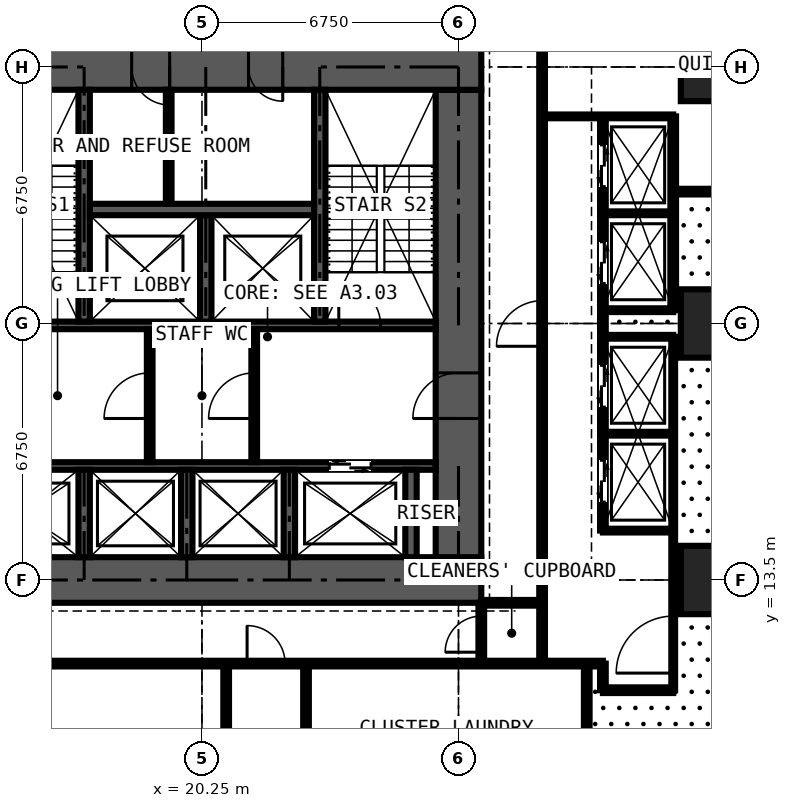
"""IFC4 building model, lengths in metres.
Left out: names, types, materials, properties, quantities, classifications, styles, units other than length and angle.
Written with IfcOpenShell. Run it as: python <this file> out.ifc"""

import sys

from ifc_helpers import new_model, si_unit, direction, frame, frame_2d, origin, origin_2d, place, context, subcontext, project, spatial, rectangle, extrude, element, fill, save


model = new_model("IFC4")
c1 = context("Model", 3, precision=1e-05, world=origin(), true_north=direction((0.0, 1.0)))
c2 = subcontext(c1, "Body", "Model", "MODEL_VIEW")
j1 = project(units=[si_unit("LENGTHUNIT", "METRE"), si_unit("PLANEANGLEUNIT", "RADIAN")], contexts=[c1])
p1 = place(None, origin())
s1 = spatial("IfcSite", under=j1, at=p1, CompositionType="ELEMENT")
p2 = place(p1, origin())
s2 = spatial("IfcBuilding", under=s1, at=p2, CompositionType="ELEMENT")
p3 = place(p2, frame((0.0, 0.0, 46.8)))
s3 = spatial("IfcBuildingStorey", under=s2, at=p3, CompositionType="ELEMENT", Elevation=46.8)
for number, where, z_axis, x_axis in (
    (1, (33.75, 13.5, 0.0), (0.0, 0.0, 1.0), (1.0, 0.0, 0.0)),
    (2, (33.75, 20.25, 0.0), (0.0, 0.0, 1.0), (1.0, 0.0, 0.0)),
    (3, (33.75, 27.0, 0.0), (0.0, 0.0, 1.0), (1.0, 0.0, 0.0)),
):
    element("IfcColumn", number, at=place(p3, frame(where, z_axis=z_axis, x_axis=x_axis)), inside=s3, PredefinedType="COLUMN", context=c2, shape_type="SweptSolid", body=[
        extrude(rectangle(XDim=1.8, YDim=1.8, at=origin_2d()), origin(), (0.0, 0.0, 1.0), 3.6),
    ])
p4 = place(p3, frame((12.9, 13.5, 0.0), z_axis=(0.0, 0.0, 1.0), x_axis=(1.0, 0.0, 0.0)))
e4 = element("IfcWall", 4, at=p4, inside=s3, PredefinedType="SHEAR", context=c2, shape_type="SweptSolid", body=[
    extrude(rectangle(XDim=14.7, YDim=1.2, at=frame_2d((7.35, 0.0))), origin(), (0.0, 0.0, 1.0), 3.6),
])
p5 = place(p3, frame((27.0, 14.1, 0.0), z_axis=(0.0, 0.0, 1.0), x_axis=(0.0, 1.0, 0.0)))
e5 = element("IfcWall", 5, at=p5, inside=s3, PredefinedType="SHEAR", context=c2, shape_type="SweptSolid", body=[
    extrude(rectangle(XDim=12.3, YDim=1.2, at=frame_2d((6.15, 0.0))), origin(), (0.0, 0.0, 1.0), 3.6),
])
p6 = place(p5, frame((3.65, 0.0, 0.0)))
e6 = element("IfcOpeningElement", 6, at=p6, cuts=e5, PredefinedType="OPENING", context=c2, shape_type="SweptSolid", body=[
    extrude(rectangle(XDim=1.2, YDim=2.2, at=frame_2d((0.6, 1.1))), frame((0.0, 0.61, 0.0), z_axis=(0.0, -1.0, 0.0), x_axis=(1.0, 0.0, 0.0)), (0.0, 0.0, 1.0), 1.22),
])
p7 = place(p3, frame((27.6, 27.0, 0.0), z_axis=(0.0, 0.0, 1.0), x_axis=(-1.0, 0.0, 0.0)))
e7 = element("IfcWall", 7, at=p7, inside=s3, PredefinedType="SHEAR", context=c2, shape_type="SweptSolid", body=[
    extrude(rectangle(XDim=14.7, YDim=1.2, at=frame_2d((7.35, 0.0))), origin(), (0.0, 0.0, 1.0), 3.6),
])
p8 = place(p7, frame((5.225, 0.0, 0.0)))
e8 = element("IfcOpeningElement", 8, at=p8, cuts=e7, PredefinedType="OPENING", context=c2, shape_type="SweptSolid", body=[
    extrude(rectangle(XDim=0.9, YDim=2.2, at=frame_2d((0.45, 1.1))), frame((0.0, 0.61, 0.0), z_axis=(0.0, -1.0, 0.0), x_axis=(1.0, 0.0, 0.0)), (0.0, 0.0, 1.0), 1.22),
])
p9 = place(p7, frame((8.2, 0.0, 0.0)))
e9 = element("IfcOpeningElement", 9, at=p9, cuts=e7, PredefinedType="OPENING", context=c2, shape_type="SweptSolid", body=[
    extrude(rectangle(XDim=1.0, YDim=2.2, at=frame_2d((0.5, 1.1))), frame((0.0, 0.61, 0.0), z_axis=(0.0, -1.0, 0.0), x_axis=(1.0, 0.0, 0.0)), (0.0, 0.0, 1.0), 1.22),
])
p10 = place(p3, frame((14.1, 16.5, 0.0), z_axis=(0.0, 0.0, 1.0), x_axis=(1.0, 0.0, 0.0)))
e10 = element("IfcWall", 10, at=p10, inside=s3, PredefinedType="SHEAR", context=c2, shape_type="SweptSolid", body=[
    extrude(rectangle(XDim=12.3, YDim=0.2, at=frame_2d((6.15, 0.0))), origin(), (0.0, 0.0, 1.0), 3.6),
])
p11 = place(p10, frame((0.9, 0.0, 0.0)))
e11 = element("IfcOpeningElement", 11, at=p11, cuts=e10, PredefinedType="OPENING", context=c2, shape_type="SweptSolid", body=[
    extrude(rectangle(XDim=1.1, YDim=2.2, at=frame_2d((0.55, 1.1))), frame((0.0, 0.11, 0.0), z_axis=(0.0, -1.0, 0.0), x_axis=(1.0, 0.0, 0.0)), (0.0, 0.0, 1.0), 0.22),
])
p12 = place(p10, frame((9.5, 0.0, 0.0)))
e12 = element("IfcOpeningElement", 12, at=p12, cuts=e10, PredefinedType="OPENING", context=c2, shape_type="SweptSolid", body=[
    extrude(rectangle(XDim=1.1, YDim=2.2, at=frame_2d((0.55, 1.1))), frame((0.0, 0.11, 0.0), z_axis=(0.0, -1.0, 0.0), x_axis=(1.0, 0.0, 0.0)), (0.0, 0.0, 1.0), 0.22),
])
p13 = place(p3, frame((14.1, 20.2, 0.0), z_axis=(0.0, 0.0, 1.0), x_axis=(1.0, 0.0, 0.0)))
e13 = element("IfcWall", 13, at=p13, inside=s3, PredefinedType="SHEAR", context=c2, shape_type="SweptSolid", body=[
    extrude(rectangle(XDim=12.3, YDim=0.2, at=frame_2d((6.15, 0.0))), origin(), (0.0, 0.0, 1.0), 3.6),
])
p14 = place(p13, frame((0.35, 0.0, 0.0)))
e14 = element("IfcOpeningElement", 14, at=p14, cuts=e13, PredefinedType="OPENING", context=c2, shape_type="SweptSolid", body=[
    extrude(rectangle(XDim=1.1, YDim=2.2, at=frame_2d((0.55, 1.1))), frame((0.0, 0.11, 0.0), z_axis=(0.0, -1.0, 0.0), x_axis=(1.0, 0.0, 0.0)), (0.0, 0.0, 1.0), 0.22),
])
p15 = place(p13, frame((9.75, 0.0, 0.0)))
e15 = element("IfcOpeningElement", 15, at=p15, cuts=e13, PredefinedType="OPENING", context=c2, shape_type="SweptSolid", body=[
    extrude(rectangle(XDim=1.1, YDim=2.2, at=frame_2d((0.55, 1.1))), frame((0.0, 0.11, 0.0), z_axis=(0.0, -1.0, 0.0), x_axis=(1.0, 0.0, 0.0)), (0.0, 0.0, 1.0), 0.22),
])
for number, where, z_axis, x_axis in (
    (16, (17.15, 20.3, 0.0), (0.0, 0.0, 1.0), (0.0, 1.0, 0.0)),
    (17, (23.35, 20.3, 0.0), (0.0, 0.0, 1.0), (0.0, 1.0, 0.0)),
):
    element("IfcWall", number, at=place(p3, frame(where, z_axis=z_axis, x_axis=x_axis)), inside=s3, PredefinedType="SHEAR", context=c2, shape_type="SweptSolid", body=[
        extrude(rectangle(XDim=6.1, YDim=0.3, at=frame_2d((3.05, 0.0))), origin(), (0.0, 0.0, 1.0), 3.6),
    ])
p16 = place(p3, frame((20.35, 20.3, 0.0), z_axis=(0.0, 0.0, 1.0), x_axis=(0.0, 1.0, 0.0)))
e18 = element("IfcWall", 18, at=p16, inside=s3, PredefinedType="SHEAR", context=c2, shape_type="SweptSolid", body=[
    extrude(rectangle(XDim=2.8, YDim=0.3, at=frame_2d((1.4, 0.0))), origin(), (0.0, 0.0, 1.0), 3.6),
])
p17 = place(p3, frame((17.3, 23.25, 0.0), z_axis=(0.0, 0.0, 1.0), x_axis=(1.0, 0.0, 0.0)))
e19 = element("IfcWall", 19, at=p17, inside=s3, PredefinedType="SHEAR", context=c2, shape_type="SweptSolid", body=[
    extrude(rectangle(XDim=5.9, YDim=0.3, at=frame_2d((2.95, 0.0))), origin(), (0.0, 0.0, 1.0), 3.6),
])
for number, where, z_axis, x_axis in (
    (20, (17.15, 14.1, 0.0), (0.0, 0.0, 1.0), (0.0, 1.0, 0.0)),
    (21, (19.85, 14.1, 0.0), (0.0, 0.0, 1.0), (0.0, 1.0, 0.0)),
    (22, (22.55, 14.1, 0.0), (0.0, 0.0, 1.0), (0.0, 1.0, 0.0)),
    (23, (25.75, 14.1, 0.0), (0.0, 0.0, 1.0), (0.0, 1.0, 0.0)),
):
    element("IfcWall", number, at=place(p3, frame(where, z_axis=z_axis, x_axis=x_axis)), inside=s3, PredefinedType="SHEAR", context=c2, shape_type="SweptSolid", body=[
        extrude(rectangle(XDim=2.3, YDim=0.3, at=frame_2d((1.15, 0.0))), origin(), (0.0, 0.0, 1.0), 3.6),
    ])
p18 = place(p3, frame((18.875, 16.6, 0.0), z_axis=(0.0, 0.0, 1.0), x_axis=(0.0, 1.0, 0.0)))
e24 = element("IfcWall", 24, at=p18, inside=s3, PredefinedType="PARTITIONING", context=c2, shape_type="SweptSolid", body=[
    extrude(rectangle(XDim=3.5, YDim=0.15, at=frame_2d((1.75, 0.0))), origin(), (0.0, 0.0, 1.0), 3.375),
])
p19 = place(p18, frame((1.15, 0.0, 0.0)))
e25 = element("IfcOpeningElement", 25, at=p19, cuts=e24, PredefinedType="OPENING", context=c2, shape_type="SweptSolid", body=[
    extrude(rectangle(XDim=1.2, YDim=2.2, at=frame_2d((0.6, 1.1))), frame((0.0, 0.085, 0.0), z_axis=(0.0, -1.0, 0.0), x_axis=(1.0, 0.0, 0.0)), (0.0, 0.0, 1.0), 0.17),
])
p20 = place(p3, frame((21.625, 16.6, 0.0), z_axis=(0.0, 0.0, 1.0), x_axis=(0.0, 1.0, 0.0)))
e26 = element("IfcWall", 26, at=p20, inside=s3, PredefinedType="PARTITIONING", context=c2, shape_type="SweptSolid", body=[
    extrude(rectangle(XDim=3.5, YDim=0.15, at=frame_2d((1.75, 0.0))), origin(), (0.0, 0.0, 1.0), 3.375),
])
p21 = place(p20, frame((1.15, 0.0, 0.0)))
e27 = element("IfcOpeningElement", 27, at=p21, cuts=e26, PredefinedType="OPENING", context=c2, shape_type="SweptSolid", body=[
    extrude(rectangle(XDim=1.2, YDim=2.2, at=frame_2d((0.6, 1.1))), frame((0.0, 0.085, 0.0), z_axis=(0.0, -1.0, 0.0), x_axis=(1.0, 0.0, 0.0)), (0.0, 0.0, 1.0), 0.17),
])
p22 = place(p3, frame((19.375, 23.4, 0.0), z_axis=(0.0, 0.0, 1.0), x_axis=(0.0, 1.0, 0.0)))
e28 = element("IfcWall", 28, at=p22, inside=s3, PredefinedType="PARTITIONING", context=c2, shape_type="SweptSolid", body=[
    extrude(rectangle(XDim=3.0, YDim=0.15, at=frame_2d((1.5, 0.0))), origin(), (0.0, 0.0, 1.0), 3.375),
])
p23 = place(p3, frame((10.125, 11.3, 0.0), z_axis=(0.0, 0.0, 1.0), x_axis=(1.0, 0.0, 0.0)))
e29 = element("IfcWall", 29, at=p23, inside=s3, PredefinedType="PARTITIONING", context=c2, shape_type="SweptSolid", body=[
    extrude(rectangle(XDim=20.675, YDim=0.15, at=frame_2d((10.337, 0.0))), origin(), (0.0, 0.0, 1.0), 3.375),
])
p24 = place(p23, frame((11.312, 0.0, 0.0)))
e30 = element("IfcOpeningElement", 30, at=p24, cuts=e29, PredefinedType="OPENING", context=c2, shape_type="SweptSolid", body=[
    extrude(rectangle(XDim=1.0, YDim=2.2, at=frame_2d((0.5, 1.1))), frame((0.0, 0.085, 0.0), z_axis=(0.0, -1.0, 0.0), x_axis=(1.0, 0.0, 0.0)), (0.0, 0.0, 1.0), 0.17),
])
for number, where, z_axis, x_axis in (
    (31, (20.887, 5.65, 0.0), (0.0, 0.0, 1.0), (0.0, 1.0, 0.0)),
    (32, (22.988, 5.65, 0.0), (0.0, 0.0, 1.0), (0.0, 1.0, 0.0)),
):
    element("IfcWall", number, at=place(p3, frame(where, z_axis=z_axis, x_axis=x_axis)), inside=s3, PredefinedType="PARTITIONING", context=c2, shape_type="SweptSolid", body=[
        extrude(rectangle(XDim=5.65, YDim=0.15, at=frame_2d((2.825, 0.0))), origin(), (0.0, 0.0, 1.0), 3.375),
    ])
p25 = place(p3, frame((27.6, 11.3, 0.0), z_axis=(0.0, 0.0, 1.0), x_axis=(0.0, 1.0, 0.0)))
e33 = element("IfcWall", 33, at=p25, inside=s3, PredefinedType="PARTITIONING", context=c2, shape_type="SweptSolid", body=[
    extrude(rectangle(XDim=1.6, YDim=0.15, at=frame_2d((0.8, 0.0))), origin(), (0.0, 0.0, 1.0), 3.375),
])
p26 = place(p25, frame((0.3, 0.0, 0.0)))
e34 = element("IfcOpeningElement", 34, at=p26, cuts=e33, PredefinedType="OPENING", context=c2, shape_type="SweptSolid", body=[
    extrude(rectangle(XDim=0.95, YDim=2.2, at=frame_2d((0.475, 1.1))), frame((0.0, 0.085, 0.0), z_axis=(0.0, -1.0, 0.0), x_axis=(1.0, 0.0, 0.0)), (0.0, 0.0, 1.0), 0.17),
])
p27 = place(p3, frame((27.6, 12.9, 0.0), z_axis=(0.0, 0.0, 1.0), x_axis=(1.0, 0.0, 0.0)))
e35 = element("IfcWall", 35, at=p27, inside=s3, PredefinedType="PARTITIONING", context=c2, shape_type="SweptSolid", body=[
    extrude(rectangle(XDim=1.6, YDim=0.15, at=frame_2d((0.8, 0.0))), origin(), (0.0, 0.0, 1.0), 2.877),
])
p28 = place(p3, frame((29.2, 11.3, 0.0), z_axis=(0.0, 0.0, 1.0), x_axis=(0.0, 1.0, 0.0)))
e36 = element("IfcWall", 36, at=p28, inside=s3, PredefinedType="PARTITIONING", context=c2, shape_type="SweptSolid", body=[
    extrude(rectangle(XDim=20.3, YDim=0.15, at=frame_2d((10.15, 0.0))), origin(), (0.0, 0.0, 1.0), 3.375),
])
p29 = place(p28, frame((8.35, 0.0, 0.0)))
e37 = element("IfcOpeningElement", 37, at=p29, cuts=e36, PredefinedType="OPENING", context=c2, shape_type="SweptSolid", body=[
    extrude(rectangle(XDim=1.2, YDim=2.2, at=frame_2d((0.6, 1.1))), frame((0.0, 0.085, 0.0), z_axis=(0.0, -1.0, 0.0), x_axis=(1.0, 0.0, 0.0)), (0.0, 0.0, 1.0), 0.17),
])
p30 = place(p3, frame((29.2, 25.7, 0.0), z_axis=(0.0, 0.0, 1.0), x_axis=(1.0, 0.0, 0.0)))
e38 = element("IfcWall", 38, at=p30, inside=s3, PredefinedType="SHEAR", context=c2, shape_type="SweptSolid", body=[
    extrude(rectangle(XDim=3.45, YDim=0.1, at=frame_2d((1.725, 0.0))), origin(), (0.0, 0.0, 1.0), 3.375),
])
p31 = place(p3, frame((30.375, -0.734, 0.0), z_axis=(0.0, 0.0, 1.0), x_axis=(0.0, 1.0, 0.0)))
e39 = element("IfcWall", 39, at=p31, inside=s3, PredefinedType="PARTITIONING", context=c2, shape_type="SweptSolid", body=[
    extrude(rectangle(XDim=12.034, YDim=0.15, at=frame_2d((6.017, 0.0))), origin(), (0.0, 0.0, 1.0), 3.375),
])
p32 = place(p3, frame((30.8, 10.6, 0.0), z_axis=(0.0, 0.0, 1.0), x_axis=(0.0, 1.0, 0.0)))
e40 = element("IfcWall", 40, at=p32, inside=s3, PredefinedType="PARTITIONING", context=c2, shape_type="SweptSolid", body=[
    extrude(rectangle(XDim=0.7, YDim=0.15, at=frame_2d((0.35, 0.0))), origin(), (0.0, 0.0, 1.0), 3.375),
])
p33 = place(p3, frame((30.8, 10.6, 0.0), z_axis=(0.0, 0.0, 1.0), x_axis=(1.0, 0.0, 0.0)))
e41 = element("IfcWall", 41, at=p33, inside=s3, PredefinedType="PARTITIONING", context=c2, shape_type="SweptSolid", body=[
    extrude(rectangle(XDim=1.85, YDim=0.15, at=frame_2d((0.925, 0.0))), origin(), (0.0, 0.0, 1.0), 3.375),
])
p34 = place(p3, frame((30.8, 14.8, 0.0), z_axis=(0.0, 0.0, 1.0), x_axis=(0.0, 1.0, 0.0)))
e42 = element("IfcWall", 42, at=p34, inside=s3, PredefinedType="PARTITIONING", context=c2, shape_type="SweptSolid", body=[
    extrude(rectangle(XDim=10.9, YDim=0.15, at=frame_2d((5.45, 0.0))), origin(), (0.0, 0.0, 1.0), 3.375),
])
p35 = place(p34, frame((0.75, 0.0, 0.0)))
e43 = element("IfcOpeningElement", 43, at=p35, cuts=e42, PredefinedType="OPENING", context=c2, shape_type="SweptSolid", body=[
    extrude(rectangle(XDim=1.1, YDim=2.2, at=frame_2d((0.55, 1.1))), frame((0.0, 0.085, 0.0), z_axis=(0.0, -1.0, 0.0), x_axis=(1.0, 0.0, 0.0)), (0.0, 0.0, 1.0), 0.17),
])
p36 = place(p34, frame((3.25, 0.0, 0.0)))
e44 = element("IfcOpeningElement", 44, at=p36, cuts=e42, PredefinedType="OPENING", context=c2, shape_type="SweptSolid", body=[
    extrude(rectangle(XDim=1.1, YDim=2.2, at=frame_2d((0.55, 1.1))), frame((0.0, 0.085, 0.0), z_axis=(0.0, -1.0, 0.0), x_axis=(1.0, 0.0, 0.0)), (0.0, 0.0, 1.0), 0.17),
])
p37 = place(p34, frame((6.5, 0.0, 0.0)))
e45 = element("IfcOpeningElement", 45, at=p37, cuts=e42, PredefinedType="OPENING", context=c2, shape_type="SweptSolid", body=[
    extrude(rectangle(XDim=1.1, YDim=2.2, at=frame_2d((0.55, 1.1))), frame((0.0, 0.085, 0.0), z_axis=(0.0, -1.0, 0.0), x_axis=(1.0, 0.0, 0.0)), (0.0, 0.0, 1.0), 0.17),
])
p38 = place(p34, frame((9.05, 0.0, 0.0)))
e46 = element("IfcOpeningElement", 46, at=p38, cuts=e42, PredefinedType="OPENING", context=c2, shape_type="SweptSolid", body=[
    extrude(rectangle(XDim=1.1, YDim=2.2, at=frame_2d((0.55, 1.1))), frame((0.0, 0.085, 0.0), z_axis=(0.0, -1.0, 0.0), x_axis=(1.0, 0.0, 0.0)), (0.0, 0.0, 1.0), 0.17),
])
for number, where, z_axis, x_axis in (
    (47, (30.8, 14.8, 0.0), (0.0, 0.0, 1.0), (1.0, 0.0, 0.0)),
    (48, (30.8, 17.35, 0.0), (0.0, 0.0, 1.0), (1.0, 0.0, 0.0)),
    (49, (30.8, 19.9, 0.0), (0.0, 0.0, 1.0), (1.0, 0.0, 0.0)),
    (50, (30.8, 20.6, 0.0), (0.0, 0.0, 1.0), (1.0, 0.0, 0.0)),
    (51, (30.8, 23.15, 0.0), (0.0, 0.0, 1.0), (1.0, 0.0, 0.0)),
):
    element("IfcWall", number, at=place(p3, frame(where, z_axis=z_axis, x_axis=x_axis)), inside=s3, PredefinedType="SHEAR", context=c2, shape_type="SweptSolid", body=[
        extrude(rectangle(XDim=1.85, YDim=0.1, at=frame_2d((0.925, 0.0))), origin(), (0.0, 0.0, 1.0), 3.375),
    ])
p39 = place(p3, frame((32.65, 10.6, 0.0), z_axis=(0.0, 0.0, 1.0), x_axis=(0.0, 1.0, 0.0)))
e52 = element("IfcWall", 52, at=p39, inside=s3, PredefinedType="SHEAR", context=c2, shape_type="SweptSolid", body=[
    extrude(rectangle(XDim=9.3, YDim=0.1, at=frame_2d((4.65, 0.0))), origin(), (0.0, 0.0, 1.0), 3.375),
])
p40 = place(p39, frame((0.45, 0.0, 0.0)))
e53 = element("IfcOpeningElement", 53, at=p40, cuts=e52, PredefinedType="OPENING", context=c2, shape_type="SweptSolid", body=[
    extrude(rectangle(XDim=1.5, YDim=2.2, at=frame_2d((0.75, 1.1))), frame((0.0, 0.06, 0.0), z_axis=(0.0, -1.0, 0.0), x_axis=(1.0, 0.0, 0.0)), (0.0, 0.0, 1.0), 0.12),
])
p41 = place(p3, frame((32.65, 20.6, 0.0), z_axis=(0.0, 0.0, 1.0), x_axis=(0.0, 1.0, 0.0)))
e54 = element("IfcWall", 54, at=p41, inside=s3, PredefinedType="PARTITIONING", context=c2, shape_type="SweptSolid", body=[
    extrude(rectangle(XDim=5.1, YDim=0.15, at=frame_2d((2.55, 0.0))), origin(), (0.0, 0.0, 1.0), 3.375),
])
p42 = place(p3, frame((32.65, 23.72, 0.0), z_axis=(0.0, 0.0, 1.0), x_axis=(1.0, 0.0, 0.0)))
e55 = element("IfcWall", 55, at=p42, inside=s3, PredefinedType="PARTITIONING", context=c2, shape_type="SweptSolid", body=[
    extrude(rectangle(XDim=8.525, YDim=0.15, at=frame_2d((4.263, 0.0))), origin(), (0.0, 0.0, 1.0), 3.375),
])
p43 = place(p42, frame((3.5, 0.0, 0.0)))
e56 = element("IfcOpeningElement", 56, at=p43, cuts=e55, PredefinedType="OPENING", context=c2, shape_type="SweptSolid", body=[
    extrude(rectangle(XDim=1.6, YDim=2.4, at=frame_2d((0.8, 1.2))), frame((0.0, 0.085, 0.0), z_axis=(0.0, -1.0, 0.0), x_axis=(1.0, 0.0, 0.0)), (0.0, 0.0, 1.0), 0.17),
])
p44 = place(p12, origin())
e57 = element("IfcDoor", 57, at=p44, inside=s3, OperationType="DOUBLE_DOOR_SLIDING", PredefinedType="DOOR", context=c2, shape_type="SweptSolid", body=[
    extrude(rectangle(XDim=1.1, YDim=2.2, at=frame_2d((0.55, 1.1))), frame((0.0, 0.025, 0.0), z_axis=(0.0, -1.0, 0.0), x_axis=(1.0, 0.0, 0.0)), (0.0, 0.0, 1.0), 0.05),
])
fill(e12, e57)
p45 = place(p6, origin())
e58 = element("IfcDoor", 58, at=p45, inside=s3, OperationType="DOUBLE_DOOR_SINGLE_SWING", PredefinedType="DOOR", context=c2, shape_type="SweptSolid", body=[
    extrude(rectangle(XDim=1.2, YDim=2.2, at=frame_2d((0.6, 1.1))), frame((0.0, 0.025, 0.0), z_axis=(0.0, -1.0, 0.0), x_axis=(1.0, 0.0, 0.0)), (0.0, 0.0, 1.0), 0.05),
])
fill(e6, e58)
p46 = place(p19, origin())
e59 = element("IfcDoor", 59, at=p46, inside=s3, OperationType="DOUBLE_DOOR_SINGLE_SWING", PredefinedType="DOOR", context=c2, shape_type="SweptSolid", body=[
    extrude(rectangle(XDim=1.2, YDim=2.2, at=frame_2d((0.6, 1.1))), frame((0.0, 0.025, 0.0), z_axis=(0.0, -1.0, 0.0), x_axis=(1.0, 0.0, 0.0)), (0.0, 0.0, 1.0), 0.05),
])
fill(e25, e59)
p47 = place(p21, origin())
e60 = element("IfcDoor", 60, at=p47, inside=s3, OperationType="DOUBLE_DOOR_SINGLE_SWING", PredefinedType="DOOR", context=c2, shape_type="SweptSolid", body=[
    extrude(rectangle(XDim=1.2, YDim=2.2, at=frame_2d((0.6, 1.1))), frame((0.0, 0.025, 0.0), z_axis=(0.0, -1.0, 0.0), x_axis=(1.0, 0.0, 0.0)), (0.0, 0.0, 1.0), 0.05),
])
fill(e27, e60)
p48 = place(p8, origin())
e61 = element("IfcDoor", 61, at=p48, inside=s3, OperationType="SINGLE_SWING_LEFT", PredefinedType="DOOR", context=c2, shape_type="SweptSolid", body=[
    extrude(rectangle(XDim=0.9, YDim=2.2, at=frame_2d((0.45, 1.1))), frame((0.0, 0.4, 0.0), z_axis=(0.0, -1.0, 0.0), x_axis=(1.0, 0.0, 0.0)), (0.0, 0.0, 1.0), 0.8),
])
fill(e8, e61)
p49 = place(p9, origin())
e62 = element("IfcDoor", 62, at=p49, inside=s3, OperationType="SINGLE_SWING_LEFT", PredefinedType="DOOR", context=c2, shape_type="SweptSolid", body=[
    extrude(rectangle(XDim=1.0, YDim=2.2, at=frame_2d((0.5, 1.1))), frame((0.0, 0.025, 0.0), z_axis=(0.0, -1.0, 0.0), x_axis=(1.0, 0.0, 0.0)), (0.0, 0.0, 1.0), 0.05),
])
fill(e9, e62)
p50 = place(p15, origin())
e63 = element("IfcDoor", 63, at=p50, inside=s3, OperationType="SINGLE_SWING_LEFT", PredefinedType="DOOR", context=c2, shape_type="SweptSolid", body=[
    extrude(rectangle(XDim=1.1, YDim=2.2, at=frame_2d((0.55, 1.1))), frame((0.0, 0.025, 0.0), z_axis=(0.0, -1.0, 0.0), x_axis=(1.0, 0.0, 0.0)), (0.0, 0.0, 1.0), 0.05),
])
fill(e15, e63)
p51 = place(p26, origin())
e64 = element("IfcDoor", 64, at=p51, inside=s3, OperationType="SINGLE_SWING_LEFT", PredefinedType="DOOR", context=c2, shape_type="SweptSolid", body=[
    extrude(rectangle(XDim=0.95, YDim=2.2, at=frame_2d((0.475, 1.1))), frame((0.0, 0.025, 0.0), z_axis=(0.0, -1.0, 0.0), x_axis=(1.0, 0.0, 0.0)), (0.0, 0.0, 1.0), 0.05),
])
fill(e34, e64)
p52 = place(p24, origin())
e65 = element("IfcDoor", 65, at=p52, inside=s3, OperationType="SINGLE_SWING_LEFT", PredefinedType="DOOR", context=c2, shape_type="SweptSolid", body=[
    extrude(rectangle(XDim=1.0, YDim=2.2, at=frame_2d((0.5, 1.1))), frame((0.0, 0.025, 0.0), z_axis=(0.0, -1.0, 0.0), x_axis=(1.0, 0.0, 0.0)), (0.0, 0.0, 1.0), 0.05),
])
fill(e30, e65)
p53 = place(p40, origin())
e66 = element("IfcDoor", 66, at=p53, inside=s3, OperationType="DOUBLE_DOOR_SINGLE_SWING", PredefinedType="DOOR", context=c2, shape_type="SweptSolid", body=[
    extrude(rectangle(XDim=1.5, YDim=2.2, at=frame_2d((0.75, 1.1))), frame((0.0, 0.025, 0.0), z_axis=(0.0, -1.0, 0.0), x_axis=(1.0, 0.0, 0.0)), (0.0, 0.0, 1.0), 0.05),
])
fill(e53, e66)
p54 = place(p35, origin())
e67 = element("IfcDoor", 67, at=p54, inside=s3, OperationType="DOUBLE_DOOR_SLIDING", PredefinedType="DOOR", context=c2, shape_type="SweptSolid", body=[
    extrude(rectangle(XDim=1.1, YDim=2.2, at=frame_2d((0.55, 1.1))), frame((0.0, 0.025, 0.0), z_axis=(0.0, -1.0, 0.0), x_axis=(1.0, 0.0, 0.0)), (0.0, 0.0, 1.0), 0.05),
])
fill(e43, e67)
p55 = place(p36, origin())
e68 = element("IfcDoor", 68, at=p55, inside=s3, OperationType="DOUBLE_DOOR_SLIDING", PredefinedType="DOOR", context=c2, shape_type="SweptSolid", body=[
    extrude(rectangle(XDim=1.1, YDim=2.2, at=frame_2d((0.55, 1.1))), frame((0.0, 0.025, 0.0), z_axis=(0.0, -1.0, 0.0), x_axis=(1.0, 0.0, 0.0)), (0.0, 0.0, 1.0), 0.05),
])
fill(e44, e68)
p56 = place(p37, origin())
e69 = element("IfcDoor", 69, at=p56, inside=s3, OperationType="DOUBLE_DOOR_SLIDING", PredefinedType="DOOR", context=c2, shape_type="SweptSolid", body=[
    extrude(rectangle(XDim=1.1, YDim=2.2, at=frame_2d((0.55, 1.1))), frame((0.0, 0.025, 0.0), z_axis=(0.0, -1.0, 0.0), x_axis=(1.0, 0.0, 0.0)), (0.0, 0.0, 1.0), 0.05),
])
fill(e45, e69)
p57 = place(p38, origin())
e70 = element("IfcDoor", 70, at=p57, inside=s3, OperationType="DOUBLE_DOOR_SLIDING", PredefinedType="DOOR", context=c2, shape_type="SweptSolid", body=[
    extrude(rectangle(XDim=1.1, YDim=2.2, at=frame_2d((0.55, 1.1))), frame((0.0, 0.025, 0.0), z_axis=(0.0, -1.0, 0.0), x_axis=(1.0, 0.0, 0.0)), (0.0, 0.0, 1.0), 0.05),
])
fill(e46, e70)
p58 = place(p29, origin())
e71 = element("IfcDoor", 71, at=p58, inside=s3, OperationType="DOUBLE_DOOR_SINGLE_SWING", PredefinedType="DOOR", context=c2, shape_type="SweptSolid", body=[
    extrude(rectangle(XDim=1.2, YDim=2.2, at=frame_2d((0.6, 1.1))), frame((0.0, 0.025, 0.0), z_axis=(0.0, -1.0, 0.0), x_axis=(1.0, 0.0, 0.0)), (0.0, 0.0, 1.0), 0.05),
])
fill(e37, e71)
save(model, sys.argv[1])
